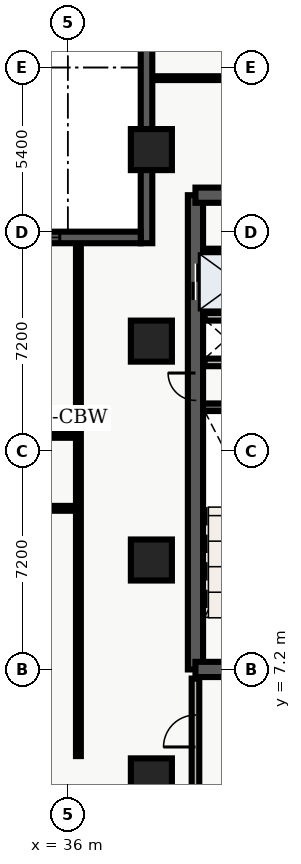
"""IFC4 building model, lengths in metres.
Left out: names, types, materials, properties, quantities, classifications, styles, units other than length and angle.
Written with IfcOpenShell. Run it as: python <this file> out.ifc"""

import sys

from ifc_helpers import new_model, entity, si_unit, converted_unit, direction, frame, origin_with_axes, origin_2d_with_axis, place, context, subcontext, project, spatial, polyline, rectangle, outline, extrude, element, fill, save


model = new_model("IFC4")
c1 = context("Model", 3, precision=1e-05, world=origin_with_axes(), true_north=direction((0.0, 1.0)))
c2 = subcontext(c1, "Body", "Model", "MODEL_VIEW")
j1 = project(units=[si_unit("LENGTHUNIT", "METRE"), converted_unit("PLANEANGLEUNIT", "DEGREE", entity("IfcPlaneAngleMeasure", 0.017), si_unit("PLANEANGLEUNIT", "RADIAN"), dimensions=[0, 0, 0, 0, 0, 0, 0])], contexts=[c1])
p1 = place(None, origin_with_axes())
s1 = spatial("IfcSite", under=j1, at=p1, CompositionType="ELEMENT")
p2 = place(p1, origin_with_axes())
s2 = spatial("IfcBuilding", under=s1, at=p2, CompositionType="ELEMENT")
p3 = place(p2, frame((0.0, 0.0, 84.6), z_axis=(0.0, 0.0, 1.0), x_axis=(1.0, 0.0, 0.0)))
s3 = spatial("IfcBuildingStorey", under=s2, at=p3, CompositionType="ELEMENT", Elevation=84.6)
p4 = place(p3, frame((40.2, 7.2, 0.0), z_axis=(0.0, 0.0, 1.0), x_axis=(0.0, 1.0, 0.0)))
e1 = element("IfcWall", 1, at=p4, inside=s3, PredefinedType="SHEAR", context=c2, shape_type="SweptSolid", body=[
    extrude(outline(polyline([(0.0, -0.25), (15.6, -0.25), (15.6, 0.25), (0.0, 0.25), (0.0, -0.25)])), origin_with_axes(), (0.0, 0.0, 1.0), 4.26),
])
p5 = place(p4, frame((12.75, 0.0, 0.0), z_axis=(0.0, 0.0, 1.0), x_axis=(1.0, 0.0, 0.0)))
e2 = element("IfcOpeningElement", 2, at=p5, cuts=e1, PredefinedType="OPENING", context=c2, shape_type="SweptSolid", body=[
    extrude(rectangle(XDim=1.2, YDim=0.52, at=origin_2d_with_axis()), origin_with_axes(), (0.0, 0.0, 1.0), 2.15),
])
p6 = place(p4, frame((9.3, 0.0, 0.0), z_axis=(0.0, 0.0, 1.0), x_axis=(1.0, 0.0, 0.0)))
e3 = element("IfcOpeningElement", 3, at=p6, cuts=e1, PredefinedType="OPENING", context=c2, shape_type="SweptSolid", body=[
    extrude(rectangle(XDim=0.9, YDim=0.52, at=origin_2d_with_axis()), origin_with_axes(), (0.0, 0.0, 1.0), 2.15),
])
p7 = place(p3, frame((40.2, 7.2, 0.0), z_axis=(0.0, 0.0, 1.0), x_axis=(1.0, 0.0, 0.0)))
e4 = element("IfcWall", 4, at=p7, inside=s3, PredefinedType="SHEAR", context=c2, shape_type="SweptSolid", body=[
    extrude(outline(polyline([(0.0, -0.25), (7.85, -0.25), (7.85, 0.25), (0.0, 0.25), (0.0, -0.25)])), origin_with_axes(), (0.0, 0.0, 1.0), 4.26),
])
p8 = place(p7, frame((2.175, 0.0, 0.0), z_axis=(0.0, 0.0, 1.0), x_axis=(1.0, 0.0, 0.0)))
e5 = element("IfcOpeningElement", 5, at=p8, cuts=e4, PredefinedType="OPENING", context=c2, shape_type="SweptSolid", body=[
    extrude(rectangle(XDim=1.05, YDim=0.52, at=origin_2d_with_axis()), origin_with_axes(), (0.0, 0.0, 1.0), 2.15),
])
p9 = place(p3, frame((40.2, 22.8, 0.0), z_axis=(0.0, 0.0, 1.0), x_axis=(1.0, 0.0, 0.0)))
e6 = element("IfcWall", 6, at=p9, inside=s3, PredefinedType="SHEAR", context=c2, shape_type="SweptSolid", body=[
    extrude(outline(polyline([(0.0, -0.25), (7.85, -0.25), (7.85, 0.25), (0.0, 0.25), (0.0, -0.25)])), origin_with_axes(), (0.0, 0.0, 1.0), 4.26),
])
p10 = place(p9, frame((5.775, 0.0, 0.0), z_axis=(0.0, 0.0, 1.0), x_axis=(1.0, 0.0, 0.0)))
e7 = element("IfcOpeningElement", 7, at=p10, cuts=e6, PredefinedType="OPENING", context=c2, shape_type="SweptSolid", body=[
    extrude(rectangle(XDim=1.05, YDim=0.52, at=origin_2d_with_axis()), origin_with_axes(), (0.0, 0.0, 1.0), 2.15),
])
p11 = place(p9, frame((2.15, 0.0, 0.0), z_axis=(0.0, 0.0, 1.0), x_axis=(1.0, 0.0, 0.0)))
e8 = element("IfcOpeningElement", 8, at=p11, cuts=e6, PredefinedType="OPENING", context=c2, shape_type="SweptSolid", body=[
    extrude(rectangle(XDim=0.9, YDim=0.52, at=origin_2d_with_axis()), origin_with_axes(), (0.0, 0.0, 1.0), 2.15),
])
p12 = place(p3, frame((40.45, 15.825, 0.0), z_axis=(0.0, 0.0, 1.0), x_axis=(1.0, 0.0, 0.0)))
e9 = element("IfcWall", 9, at=p12, inside=s3, PredefinedType="SHEAR", context=c2, shape_type="SweptSolid", body=[
    extrude(outline(polyline([(0.0, -0.125), (3.55, -0.125), (3.55, 0.125), (0.0, 0.125), (0.0, -0.125)])), origin_with_axes(), (0.0, 0.0, 1.0), 4.26),
])
p13 = place(p3, frame((40.5, 17.3, 0.0), z_axis=(0.0, 0.0, 1.0), x_axis=(1.0, 0.0, 0.0)))
e10 = element("IfcWall", 10, at=p13, inside=s3, PredefinedType="SOLIDWALL", context=c2, shape_type="SweptSolid", body=[
    extrude(outline(polyline([(0.0, -0.125), (3.5, -0.125), (3.5, 0.125), (0.0, 0.125), (0.0, -0.125)])), origin_with_axes(), (0.0, 0.0, 1.0), 3.3),
])
p14 = place(p13, frame((2.4, 0.0, 0.0), z_axis=(0.0, 0.0, 1.0), x_axis=(1.0, 0.0, 0.0)))
e11 = element("IfcOpeningElement", 11, at=p14, cuts=e10, PredefinedType="OPENING", context=c2, shape_type="SweptSolid", body=[
    extrude(rectangle(XDim=0.9, YDim=0.27, at=origin_2d_with_axis()), origin_with_axes(), (0.0, 0.0, 1.0), 2.15),
])
p15 = place(p3, frame((40.5, 18.8, 0.0), z_axis=(0.0, 0.0, 1.0), x_axis=(1.0, 0.0, 0.0)))
e12 = element("IfcWall", 12, at=p15, inside=s3, PredefinedType="SOLIDWALL", context=c2, shape_type="SweptSolid", body=[
    extrude(outline(polyline([(0.0, -0.125), (3.5, -0.125), (3.5, 0.125), (0.0, 0.125), (0.0, -0.125)])), origin_with_axes(), (0.0, 0.0, 1.0), 3.3),
])
p16 = place(p3, frame((40.2, 3.1, 0.0), z_axis=(0.0, 0.0, 1.0), x_axis=(0.0, 1.0, 0.0)))
e13 = element("IfcWall", 13, at=p16, inside=s3, PredefinedType="SOLIDWALL", context=c2, shape_type="SweptSolid", body=[
    extrude(outline(polyline([(0.0, -0.125), (3.8, -0.125), (3.8, 0.125), (0.0, 0.125), (0.0, -0.125)])), origin_with_axes(), (0.0, 0.0, 1.0), 3.3),
])
p17 = place(p16, frame((2.075, 0.0, 0.0), z_axis=(0.0, 0.0, 1.0), x_axis=(1.0, 0.0, 0.0)))
e14 = element("IfcOpeningElement", 14, at=p17, cuts=e13, PredefinedType="OPENING", context=c2, shape_type="SweptSolid", body=[
    extrude(rectangle(XDim=1.05, YDim=0.27, at=origin_2d_with_axis()), origin_with_axes(), (0.0, 0.0, 1.0), 2.15),
])
for number, where, z_axis, x_axis in (
    (15, (38.75, 3.6, 0.0), (0.0, 0.0, 1.0), (1.0, 0.0, 0.0)),
    (16, (38.75, 10.8, 0.0), (0.0, 0.0, 1.0), (1.0, 0.0, 0.0)),
    (17, (38.75, 18.0, 0.0), (0.0, 0.0, 1.0), (1.0, 0.0, 0.0)),
    (18, (38.75, 24.3, 0.0), (0.0, 0.0, 1.0), (1.0, 0.0, 0.0)),
):
    element("IfcColumn", number, at=place(p3, frame(where, z_axis=z_axis, x_axis=x_axis)), inside=s3, PredefinedType="COLUMN", context=c2, shape_type="SweptSolid", body=[
        extrude(rectangle(XDim=1.35, YDim=1.35, at=origin_2d_with_axis()), origin_with_axes(), (0.0, 0.0, 1.0), 4.5),
    ])
p18 = place(p3, frame((40.5, 20.96, 0.0), z_axis=(0.0, 0.0, 1.0), x_axis=(1.0, 0.0, 0.0)))
e19 = element("IfcWall", 19, at=p18, inside=s3, PredefinedType="PARTITIONING", context=c2, shape_type="SweptSolid", body=[
    extrude(outline(polyline([(0.0, -0.08), (3.5, -0.08), (3.5, 0.08), (0.0, 0.08), (0.0, -0.08)])), origin_with_axes(), (0.0, 0.0, 1.0), 3.2),
])
p19 = place(p3, frame((21.15, 12.5, 0.0), z_axis=(0.0, 0.0, 1.0), x_axis=(1.0, 0.0, 0.0)))
e20 = element("IfcWall", 20, at=p19, inside=s3, PredefinedType="PARTITIONING", context=c2, shape_type="SweptSolid", body=[
    extrude(outline(polyline([(0.0, -0.08), (15.2, -0.08), (15.2, 0.08), (0.0, 0.08), (0.0, -0.08)])), origin_with_axes(), (0.0, 0.0, 1.0), 3.2),
])
p20 = place(p19, frame((3.491, 0.0, 0.0), z_axis=(0.0, 0.0, 1.0), x_axis=(1.0, 0.0, 0.0)))
e21 = element("IfcOpeningElement", 21, at=p20, cuts=e20, PredefinedType="OPENING", context=c2, shape_type="SweptSolid", body=[
    extrude(rectangle(XDim=1.0, YDim=0.18, at=origin_2d_with_axis()), origin_with_axes(), (0.0, 0.0, 1.0), 2.15),
])
p21 = place(p19, frame((10.961, 0.0, 0.0), z_axis=(0.0, 0.0, 1.0), x_axis=(1.0, 0.0, 0.0)))
e22 = element("IfcOpeningElement", 22, at=p21, cuts=e20, PredefinedType="OPENING", context=c2, shape_type="SweptSolid", body=[
    extrude(rectangle(XDim=1.0, YDim=0.18, at=origin_2d_with_axis()), origin_with_axes(), (0.0, 0.0, 1.0), 2.15),
])
p22 = place(p3, frame((21.15, 14.9, 0.0), z_axis=(0.0, 0.0, 1.0), x_axis=(1.0, 0.0, 0.0)))
e23 = element("IfcWall", 23, at=p22, inside=s3, PredefinedType="PARTITIONING", context=c2, shape_type="SweptSolid", body=[
    extrude(outline(polyline([(0.0, -0.08), (15.2, -0.08), (15.2, 0.08), (0.0, 0.08), (0.0, -0.08)])), origin_with_axes(), (0.0, 0.0, 1.0), 3.2),
])
p23 = place(p22, frame((3.515, 0.0, 0.0), z_axis=(0.0, 0.0, 1.0), x_axis=(1.0, 0.0, 0.0)))
e24 = element("IfcOpeningElement", 24, at=p23, cuts=e23, PredefinedType="OPENING", context=c2, shape_type="SweptSolid", body=[
    extrude(rectangle(XDim=1.0, YDim=0.18, at=origin_2d_with_axis()), origin_with_axes(), (0.0, 0.0, 1.0), 2.15),
])
p24 = place(p22, frame((10.986, 0.0, 0.0), z_axis=(0.0, 0.0, 1.0), x_axis=(1.0, 0.0, 0.0)))
e25 = element("IfcOpeningElement", 25, at=p24, cuts=e23, PredefinedType="OPENING", context=c2, shape_type="SweptSolid", body=[
    extrude(rectangle(XDim=1.0, YDim=0.18, at=origin_2d_with_axis()), origin_with_axes(), (0.0, 0.0, 1.0), 2.15),
])
p25 = place(p3, frame((36.35, 4.35, 0.0), z_axis=(0.0, 0.0, 1.0), x_axis=(0.0, 1.0, 0.0)))
e26 = element("IfcWall", 26, at=p25, inside=s3, PredefinedType="PARTITIONING", context=c2, shape_type="SweptSolid", body=[
    extrude(outline(polyline([(0.0, -0.08), (16.95, -0.08), (16.95, 0.08), (0.0, 0.08), (0.0, -0.08)])), origin_with_axes(), (0.0, 0.0, 1.0), 3.2),
])
p26 = place(p3, frame((38.76, 26.65, 0.0), z_axis=(0.0, 0.0, 1.0), x_axis=(1.0, 0.0, 0.0)))
e27 = element("IfcWall", 27, at=p26, inside=s3, PredefinedType="PARTITIONING", context=c2, shape_type="SweptSolid", body=[
    extrude(outline(polyline([(0.0, -0.062), (20.88, -0.062), (20.88, 0.062), (0.0, 0.062), (0.0, -0.062)])), origin_with_axes(), (0.0, 0.0, 1.0), 3.2),
])
p27 = place(p26, frame((4.24, 0.0, 0.0), z_axis=(0.0, 0.0, 1.0), x_axis=(1.0, 0.0, 0.0)))
e28 = element("IfcOpeningElement", 28, at=p27, cuts=e27, PredefinedType="OPENING", context=c2, shape_type="SweptSolid", body=[
    extrude(rectangle(XDim=1.0, YDim=0.145, at=origin_2d_with_axis()), origin_with_axes(), (0.0, 0.0, 1.0), 2.15),
])
p28 = place(p3, frame((38.59, 21.22, 0.0), z_axis=(0.0, 0.0, 1.0), x_axis=(0.0, 1.0, 0.0)))
e29 = element("IfcWall", 29, at=p28, inside=s3, PredefinedType="SOLIDWALL", context=c2, shape_type="SweptSolid", body=[
    extrude(outline(polyline([(0.0, -0.19), (7.58, -0.19), (7.58, 0.19), (0.0, 0.19), (0.0, -0.19)])), origin_with_axes(), (0.0, 0.0, 1.0), 4.26),
])
p29 = place(p3, frame((21.22, 21.41, 0.0), z_axis=(0.0, 0.0, 1.0), x_axis=(1.0, 0.0, 0.0)))
e30 = element("IfcWall", 30, at=p29, inside=s3, PredefinedType="SOLIDWALL", context=c2, shape_type="SweptSolid", body=[
    extrude(outline(polyline([(0.0, -0.19), (17.18, -0.19), (17.18, 0.19), (0.0, 0.19), (0.0, -0.19)])), origin_with_axes(), (0.0, 0.0, 1.0), 4.26),
])
p30 = place(p29, frame((3.263, 0.0, 0.45), z_axis=(0.0, 0.0, 1.0), x_axis=(1.0, 0.0, 0.0)))
e31 = element("IfcOpeningElement", 31, at=p30, cuts=e30, PredefinedType="OPENING", context=c2, shape_type="SweptSolid", body=[
    extrude(rectangle(XDim=2.1, YDim=0.4, at=origin_2d_with_axis()), origin_with_axes(), (0.0, 0.0, 1.0), 2.2),
])
p31 = place(p29, frame((8.59, 0.0, 0.45), z_axis=(0.0, 0.0, 1.0), x_axis=(1.0, 0.0, 0.0)))
e32 = element("IfcOpeningElement", 32, at=p31, cuts=e30, PredefinedType="OPENING", context=c2, shape_type="SweptSolid", body=[
    extrude(rectangle(XDim=2.1, YDim=0.4, at=origin_2d_with_axis()), origin_with_axes(), (0.0, 0.0, 1.0), 2.2),
])
p32 = place(p29, frame((13.467, 0.0, 0.45), z_axis=(0.0, 0.0, 1.0), x_axis=(1.0, 0.0, 0.0)))
e33 = element("IfcOpeningElement", 33, at=p32, cuts=e30, PredefinedType="OPENING", context=c2, shape_type="SweptSolid", body=[
    extrude(rectangle(XDim=2.1, YDim=0.4, at=origin_2d_with_axis()), origin_with_axes(), (0.0, 0.0, 1.0), 2.2),
])
p33 = place(p4, frame((12.75, 0.0, 0.0), z_axis=(0.0, 0.0, 1.0), x_axis=(1.0, 0.0, 0.0)))
e34 = element("IfcDoor", 34, at=p33, inside=s3, OperationType="DOUBLE_DOOR_SLIDING", PredefinedType="DOOR", context=c2, shape_type="SweptSolid", body=[
    extrude(rectangle(XDim=1.2, YDim=0.09, at=origin_2d_with_axis()), origin_with_axes(), (0.0, 0.0, 1.0), 2.15),
])
fill(e2, e34)
p34 = place(p4, frame((9.3, 0.0, 0.0), z_axis=(0.0, 0.0, 1.0), x_axis=(1.0, 0.0, 0.0)))
e35 = element("IfcDoor", 35, at=p34, inside=s3, OperationType="SINGLE_SWING_RIGHT", PredefinedType="DOOR", context=c2, shape_type="SweptSolid", body=[
    extrude(rectangle(XDim=0.9, YDim=0.09, at=origin_2d_with_axis()), origin_with_axes(), (0.0, 0.0, 1.0), 2.15),
])
fill(e3, e35)
p35 = place(p16, frame((2.075, 0.0, 0.0), z_axis=(0.0, 0.0, 1.0), x_axis=(1.0, 0.0, 0.0)))
e36 = element("IfcDoor", 36, at=p35, inside=s3, OperationType="SINGLE_SWING_LEFT", PredefinedType="DOOR", context=c2, shape_type="SweptSolid", body=[
    extrude(rectangle(XDim=1.05, YDim=0.09, at=origin_2d_with_axis()), origin_with_axes(), (0.0, 0.0, 1.0), 2.15),
])
fill(e14, e36)
p36 = place(p29, frame((13.467, 0.0, 0.45), z_axis=(0.0, 0.0, 1.0), x_axis=(1.0, 0.0, 0.0)))
e37 = element("IfcWindow", 37, at=p36, inside=s3, PredefinedType="WINDOW", context=c2, shape_type="SweptSolid", body=[
    extrude(rectangle(XDim=2.1, YDim=0.09, at=origin_2d_with_axis()), origin_with_axes(), (0.0, 0.0, 1.0), 2.2),
])
fill(e33, e37)
save(model, sys.argv[1])
